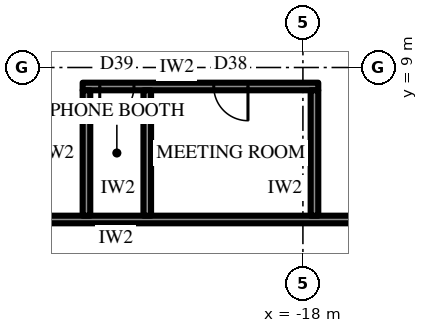
"""IFC4 building model, lengths in metres.
Left out: names, types, materials, properties, quantities, classifications, styles, units other than length and angle.
Written with IfcOpenShell. Run it as: python <this file> out.ifc"""

import sys

from ifc_helpers import new_model, si_unit, direction, frame, frame_2d, origin, place, context, subcontext, project, spatial, rectangle, extrude, element, fill, save


model = new_model("IFC4")
c1 = context("Model", 3, precision=1e-05, world=origin(), true_north=direction((0.0, 1.0)))
c2 = subcontext(c1, "Body", "Model", "MODEL_VIEW")
j1 = project(units=[si_unit("LENGTHUNIT", "METRE"), si_unit("PLANEANGLEUNIT", "RADIAN")], contexts=[c1])
p1 = place(None, origin())
s1 = spatial("IfcSite", under=j1, at=p1, CompositionType="ELEMENT")
p2 = place(p1, origin())
s2 = spatial("IfcBuilding", under=s1, at=p2, CompositionType="ELEMENT")
p3 = place(p2, frame((0.0, 0.0, 232.3)))
s3 = spatial("IfcBuildingStorey", under=s2, at=p3, CompositionType="ELEMENT", Elevation=232.3)
p4 = place(p3, frame((-15.5, 5.0, 0.0), z_axis=(0.0, 0.0, 1.0), x_axis=(-1.0, 0.0, 0.0)))
e1 = element("IfcWall", 1, at=p4, inside=s3, PredefinedType="PARTITIONING", context=c2, shape_type="SweptSolid", body=[
    extrude(rectangle(XDim=14.845, YDim=0.2, at=frame_2d((7.423, 0.0))), origin(), (0.0, 0.0, 1.0), 4.0),
])
p5 = place(p3, frame((-17.596, 8.5, 0.0), z_axis=(0.0, 0.0, 1.0), x_axis=(-1.0, 0.0, 0.0)))
e2 = element("IfcWall", 2, at=p5, inside=s3, PredefinedType="PARTITIONING", context=c2, shape_type="SweptSolid", body=[
    extrude(rectangle(XDim=6.2, YDim=0.2, at=frame_2d((3.1, 0.0))), origin(), (0.0, 0.0, 1.0), 4.0),
])
p6 = place(p5, frame((1.85, 0.0, 0.0)))
e3 = element("IfcOpeningElement", 3, at=p6, cuts=e2, PredefinedType="OPENING", context=c2, shape_type="SweptSolid", body=[
    extrude(rectangle(XDim=0.9, YDim=2.2, at=frame_2d((0.45, 1.1))), frame((0.0, 0.11, 0.0), z_axis=(0.0, -1.0, 0.0), x_axis=(1.0, 0.0, 0.0)), (0.0, 0.0, 1.0), 0.22),
])
p7 = place(p5, frame((4.85, 0.0, 0.0)))
e4 = element("IfcOpeningElement", 4, at=p7, cuts=e2, PredefinedType="OPENING", context=c2, shape_type="SweptSolid", body=[
    extrude(rectangle(XDim=0.9, YDim=2.2, at=frame_2d((0.45, 1.1))), frame((0.0, 0.11, 0.0), z_axis=(0.0, -1.0, 0.0), x_axis=(1.0, 0.0, 0.0)), (0.0, 0.0, 1.0), 0.22),
])
for number, where, z_axis, x_axis in (
    (5, (-17.696, 5.1, 0.0), (0.0, 0.0, 1.0), (0.0, 1.0, 0.0)),
    (6, (-22.096, 5.1, 0.0), (0.0, 0.0, 1.0), (0.0, 1.0, 0.0)),
    (7, (-23.696, 5.1, 0.0), (0.0, 0.0, 1.0), (0.0, 1.0, 0.0)),
):
    element("IfcWall", number, at=place(p3, frame(where, z_axis=z_axis, x_axis=x_axis)), inside=s3, PredefinedType="PARTITIONING", context=c2, shape_type="SweptSolid", body=[
        extrude(rectangle(XDim=3.3, YDim=0.2, at=frame_2d((1.65, 0.0))), origin(), (0.0, 0.0, 1.0), 4.0),
    ])
p8 = place(p6, origin())
e8 = element("IfcDoor", 8, at=p8, inside=s3, OperationType="SINGLE_SWING_RIGHT", PredefinedType="DOOR", context=c2, shape_type="SweptSolid", body=[
    extrude(rectangle(XDim=0.9, YDim=2.2, at=frame_2d((0.45, 1.1))), frame((0.0, 0.025, 0.0), z_axis=(0.0, -1.0, 0.0), x_axis=(1.0, 0.0, 0.0)), (0.0, 0.0, 1.0), 0.05),
])
fill(e3, e8)
p9 = place(p7, origin())
e9 = element("IfcDoor", 9, at=p9, inside=s3, OperationType="SINGLE_SWING_LEFT", PredefinedType="DOOR", context=c2, shape_type="SweptSolid", body=[
    extrude(rectangle(XDim=0.9, YDim=2.2, at=frame_2d((0.45, 1.1))), frame((0.0, 0.025, 0.0), z_axis=(0.0, -1.0, 0.0), x_axis=(1.0, 0.0, 0.0)), (0.0, 0.0, 1.0), 0.05),
])
fill(e4, e9)
save(model, sys.argv[1])
